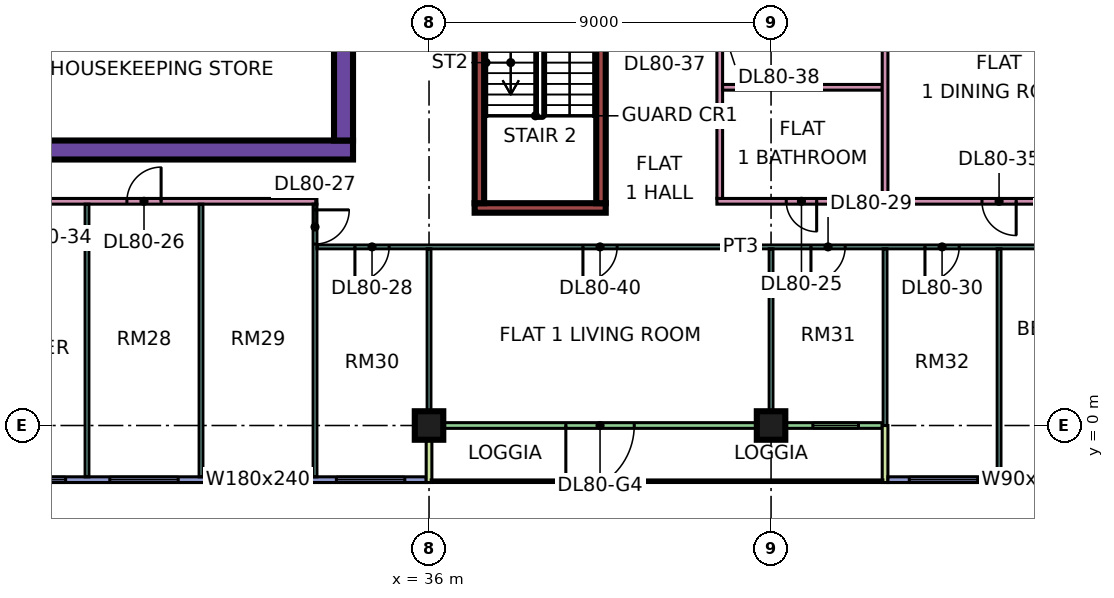
"""IFC4 building model, lengths in metres.
Left out: names, types, materials, properties, quantities, classifications, styles, units other than length and angle.
Written with IfcOpenShell. Run it as: python <this file> out.ifc"""

import sys

from ifc_helpers import new_model, si_unit, direction, frame, frame_2d, origin, origin_2d, place, context, subcontext, project, spatial, rectangle, extrude, element, fill, save


model = new_model("IFC4")
c1 = context("Model", 3, precision=1e-05, world=origin(), true_north=direction((0.0, 1.0)))
c2 = subcontext(c1, "Body", "Model", "MODEL_VIEW")
j1 = project(units=[si_unit("LENGTHUNIT", "METRE"), si_unit("PLANEANGLEUNIT", "RADIAN")], contexts=[c1])
p1 = place(None, origin())
s1 = spatial("IfcSite", under=j1, at=p1, CompositionType="ELEMENT")
p2 = place(p1, origin())
s2 = spatial("IfcBuilding", under=s1, at=p2, CompositionType="ELEMENT")
p3 = place(p2, frame((0.0, 0.0, 346.4)))
s3 = spatial("IfcBuildingStorey", under=s2, at=p3, CompositionType="ELEMENT", Elevation=346.4)
for number, where, z_axis, x_axis in (
    (1, (36.0, 0.0, 0.0), (0.0, 0.0, 1.0), (1.0, 0.0, 0.0)),
    (2, (45.0, 0.0, 0.0), (0.0, 0.0, 1.0), (1.0, 0.0, 0.0)),
):
    element("IfcColumn", number, at=place(p3, frame(where, z_axis=z_axis, x_axis=x_axis)), inside=s3, PredefinedType="COLUMN", context=c2, shape_type="SweptSolid", body=[
        extrude(rectangle(XDim=0.75, YDim=0.75, at=origin_2d()), origin(), (0.0, 0.0, 1.0), 3.75),
    ])
p4 = place(p3, frame((9.0, 7.25, 0.0), z_axis=(0.0, 0.0, 1.0), x_axis=(1.0, 0.0, 0.0)))
e3 = element("IfcWall", 3, at=p4, inside=s3, PredefinedType="SHEAR", context=c2, shape_type="SweptSolid", body=[
    extrude(rectangle(XDim=25.0, YDim=0.5, at=frame_2d((12.5, 0.0))), origin(), (0.0, 0.0, 1.0), 3.75),
])
p5 = place(p3, frame((33.75, 7.5, 0.0), z_axis=(0.0, 0.0, 1.0), x_axis=(0.0, 1.0, 0.0)))
e4 = element("IfcWall", 4, at=p5, inside=s3, PredefinedType="SHEAR", context=c2, shape_type="SweptSolid", body=[
    extrude(rectangle(XDim=12.0, YDim=0.5, at=frame_2d((6.0, 0.0))), origin(), (0.0, 0.0, 1.0), 3.75),
])
p6 = place(p5, frame((5.7, 0.0, 0.0)))
e5 = element("IfcOpeningElement", 5, at=p6, cuts=e4, PredefinedType="OPENING", context=c2, shape_type="SweptSolid", body=[
    extrude(rectangle(XDim=1.8, YDim=2.4, at=frame_2d((0.9, 1.2))), frame((0.0, 0.26, 0.0), z_axis=(0.0, -1.0, 0.0), x_axis=(1.0, 0.0, 0.0)), (0.0, 0.0, 1.0), 0.52),
])
p7 = place(p3, frame((37.2, 5.725, 0.0), z_axis=(0.0, 0.0, 1.0), x_axis=(1.0, 0.0, 0.0)))
e6 = element("IfcWall", 6, at=p7, inside=s3, PredefinedType="SHEAR", context=c2, shape_type="SweptSolid", body=[
    extrude(rectangle(XDim=3.45, YDim=0.25, at=frame_2d((1.725, 0.0))), origin(), (0.0, 0.0, 1.0), 3.75),
])
for number, where, z_axis, x_axis in (
    (7, (37.325, 5.85, 0.0), (0.0, 0.0, 1.0), (0.0, 1.0, 0.0)),
    (8, (40.525, 5.85, 0.0), (0.0, 0.0, 1.0), (0.0, 1.0, 0.0)),
):
    element("IfcWall", number, at=place(p3, frame(where, z_axis=z_axis, x_axis=x_axis)), inside=s3, PredefinedType="SHEAR", context=c2, shape_type="SweptSolid", body=[
        extrude(rectangle(XDim=6.5, YDim=0.25, at=frame_2d((3.25, 0.0))), origin(), (0.0, 0.0, 1.0), 3.75),
    ])
p8 = place(p3, frame((24.075, -1.425, 0.0), z_axis=(0.0, 0.0, 1.0), x_axis=(1.0, 0.0, 0.0)))
e9 = element("IfcWall", 9, at=p8, inside=s3, PredefinedType="SOLIDWALL", context=c2, shape_type="SweptSolid", body=[
    extrude(rectangle(XDim=11.85, YDim=0.15, at=frame_2d((5.925, 0.0))), origin(), (0.0, 0.0, 1.0), 3.35),
])
p9 = place(p8, frame((0.562, 0.0, 0.45)))
e10 = element("IfcOpeningElement", 10, at=p9, cuts=e9, PredefinedType="OPENING", context=c2, shape_type="SweptSolid", body=[
    extrude(rectangle(XDim=1.8, YDim=2.4, at=frame_2d((0.9, 1.2))), frame((0.0, 0.085, 0.0), z_axis=(0.0, -1.0, 0.0), x_axis=(1.0, 0.0, 0.0)), (0.0, 0.0, 1.0), 0.17),
])
p10 = place(p8, frame((3.525, 0.0, 0.45)))
e11 = element("IfcOpeningElement", 11, at=p10, cuts=e9, PredefinedType="OPENING", context=c2, shape_type="SweptSolid", body=[
    extrude(rectangle(XDim=1.8, YDim=2.4, at=frame_2d((0.9, 1.2))), frame((0.0, 0.085, 0.0), z_axis=(0.0, -1.0, 0.0), x_axis=(1.0, 0.0, 0.0)), (0.0, 0.0, 1.0), 0.17),
])
p11 = place(p8, frame((6.525, 0.0, 0.45)))
e12 = element("IfcOpeningElement", 12, at=p11, cuts=e9, PredefinedType="OPENING", context=c2, shape_type="SweptSolid", body=[
    extrude(rectangle(XDim=1.8, YDim=2.4, at=frame_2d((0.9, 1.2))), frame((0.0, 0.085, 0.0), z_axis=(0.0, -1.0, 0.0), x_axis=(1.0, 0.0, 0.0)), (0.0, 0.0, 1.0), 0.17),
])
p12 = place(p8, frame((9.488, 0.0, 0.45)))
e13 = element("IfcOpeningElement", 13, at=p12, cuts=e9, PredefinedType="OPENING", context=c2, shape_type="SweptSolid", body=[
    extrude(rectangle(XDim=1.8, YDim=2.4, at=frame_2d((0.9, 1.2))), frame((0.0, 0.085, 0.0), z_axis=(0.0, -1.0, 0.0), x_axis=(1.0, 0.0, 0.0)), (0.0, 0.0, 1.0), 0.17),
])
p13 = place(p3, frame((36.075, 0.0, 0.0), z_axis=(0.0, 0.0, 1.0), x_axis=(1.0, 0.0, 0.0)))
e14 = element("IfcWall", 14, at=p13, inside=s3, PredefinedType="SOLIDWALL", context=c2, shape_type="SweptSolid", body=[
    extrude(rectangle(XDim=11.85, YDim=0.15, at=frame_2d((5.925, 0.0))), origin(), (0.0, 0.0, 1.0), 3.35),
])
p14 = place(p13, frame((3.525, 0.0, 0.0)))
e15 = element("IfcOpeningElement", 15, at=p14, cuts=e14, PredefinedType="OPENING", context=c2, shape_type="SweptSolid", body=[
    extrude(rectangle(XDim=1.8, YDim=2.4, at=frame_2d((0.9, 1.2))), frame((0.0, 0.085, 0.0), z_axis=(0.0, -1.0, 0.0), x_axis=(1.0, 0.0, 0.0)), (0.0, 0.0, 1.0), 0.17),
])
p15 = place(p13, frame((10.025, 0.0, 0.45)))
e16 = element("IfcOpeningElement", 16, at=p15, cuts=e14, PredefinedType="OPENING", context=c2, shape_type="SweptSolid", body=[
    extrude(rectangle(XDim=1.2, YDim=2.4, at=frame_2d((0.6, 1.2))), frame((0.0, 0.085, 0.0), z_axis=(0.0, -1.0, 0.0), x_axis=(1.0, 0.0, 0.0)), (0.0, 0.0, 1.0), 0.17),
])
for number, where, z_axis, x_axis in (
    (17, (36.0, -1.5, 0.0), (0.0, 0.0, 1.0), (0.0, 1.0, 0.0)),
    (18, (48.0, -1.5, 0.0), (0.0, 0.0, 1.0), (0.0, 1.0, 0.0)),
):
    element("IfcWall", number, at=place(p3, frame(where, z_axis=z_axis, x_axis=x_axis)), inside=s3, PredefinedType="SOLIDWALL", context=c2, shape_type="SweptSolid", body=[
        extrude(rectangle(XDim=1.5, YDim=0.15, at=frame_2d((0.75, 0.0))), origin(), (0.0, 0.0, 1.0), 3.35),
    ])
p16 = place(p3, frame((48.075, -1.425, 0.0), z_axis=(0.0, 0.0, 1.0), x_axis=(1.0, 0.0, 0.0)))
e19 = element("IfcWall", 19, at=p16, inside=s3, PredefinedType="SOLIDWALL", context=c2, shape_type="SweptSolid", body=[
    extrude(rectangle(XDim=4.425, YDim=0.15, at=frame_2d((2.212, 0.0))), origin(), (0.0, 0.0, 1.0), 3.35),
])
p17 = place(p16, frame((0.562, 0.0, 0.45)))
e20 = element("IfcOpeningElement", 20, at=p17, cuts=e19, PredefinedType="OPENING", context=c2, shape_type="SweptSolid", body=[
    extrude(rectangle(XDim=1.8, YDim=2.4, at=frame_2d((0.9, 1.2))), frame((0.0, 0.085, 0.0), z_axis=(0.0, -1.0, 0.0), x_axis=(1.0, 0.0, 0.0)), (0.0, 0.0, 1.0), 0.17),
])
p18 = place(p16, frame((3.225, 0.0, 0.45)))
e21 = element("IfcOpeningElement", 21, at=p18, cuts=e19, PredefinedType="OPENING", context=c2, shape_type="SweptSolid", body=[
    extrude(rectangle(XDim=0.9, YDim=2.4, at=frame_2d((0.45, 1.2))), frame((0.0, 0.085, 0.0), z_axis=(0.0, -1.0, 0.0), x_axis=(1.0, 0.0, 0.0)), (0.0, 0.0, 1.0), 0.17),
])
p19 = place(p3, frame((11.95, 5.9, 0.0), z_axis=(0.0, 0.0, 1.0), x_axis=(1.0, 0.0, 0.0)))
e22 = element("IfcWall", 22, at=p19, inside=s3, PredefinedType="PARTITIONING", context=c2, shape_type="SweptSolid", body=[
    extrude(rectangle(XDim=21.1, YDim=0.15, at=frame_2d((10.55, 0.0))), origin(), (0.0, 0.0, 1.0), 3.35),
])
p20 = place(p19, frame((16.1, 0.0, 0.0)))
e23 = element("IfcOpeningElement", 23, at=p20, cuts=e22, PredefinedType="OPENING", context=c2, shape_type="SweptSolid", body=[
    extrude(rectangle(XDim=0.9, YDim=2.1, at=frame_2d((0.45, 1.05))), frame((0.0, 0.085, 0.0), z_axis=(0.0, -1.0, 0.0), x_axis=(1.0, 0.0, 0.0)), (0.0, 0.0, 1.0), 0.17),
])
p21 = place(p19, frame((13.1, 0.0, 0.0)))
e24 = element("IfcOpeningElement", 24, at=p21, cuts=e22, PredefinedType="OPENING", context=c2, shape_type="SweptSolid", body=[
    extrude(rectangle(XDim=0.9, YDim=2.1, at=frame_2d((0.45, 1.05))), frame((0.0, 0.085, 0.0), z_axis=(0.0, -1.0, 0.0), x_axis=(1.0, 0.0, 0.0)), (0.0, 0.0, 1.0), 0.17),
])
p22 = place(p19, frame((4.1, 0.0, 0.0)))
e25 = element("IfcOpeningElement", 25, at=p22, cuts=e22, PredefinedType="OPENING", context=c2, shape_type="SweptSolid", body=[
    extrude(rectangle(XDim=0.9, YDim=2.1, at=frame_2d((0.45, 1.05))), frame((0.0, 0.085, 0.0), z_axis=(0.0, -1.0, 0.0), x_axis=(1.0, 0.0, 0.0)), (0.0, 0.0, 1.0), 0.17),
])
for number, where, z_axis, x_axis in (
    (26, (27.0, -1.351, 0.0), (0.0, 0.0, 1.0), (0.0, 1.0, 0.0)),
    (27, (30.0, -1.351, 0.0), (0.0, 0.0, 1.0), (0.0, 1.0, 0.0)),
):
    element("IfcWall", number, at=place(p3, frame(where, z_axis=z_axis, x_axis=x_axis)), inside=s3, PredefinedType="PARTITIONING", context=c2, shape_type="SweptSolid", body=[
        extrude(rectangle(XDim=7.176, YDim=0.1, at=frame_2d((3.588, 0.0))), origin(), (0.0, 0.0, 1.0), 3.35),
    ])
p23 = place(p3, frame((33.0, -1.351, 0.0), z_axis=(0.0, 0.0, 1.0), x_axis=(0.0, 1.0, 0.0)))
e28 = element("IfcWall", 28, at=p23, inside=s3, PredefinedType="PARTITIONING", context=c2, shape_type="SweptSolid", body=[
    extrude(rectangle(XDim=7.176, YDim=0.1, at=frame_2d((3.588, 0.0))), origin(), (0.0, 0.0, 1.0), 3.35),
])
p24 = place(p23, frame((6.126, 0.0, 0.0)))
e29 = element("IfcOpeningElement", 29, at=p24, cuts=e28, PredefinedType="OPENING", context=c2, shape_type="SweptSolid", body=[
    extrude(rectangle(XDim=0.9, YDim=2.1, at=frame_2d((0.45, 1.05))), frame((0.0, 0.06, 0.0), z_axis=(0.0, -1.0, 0.0), x_axis=(1.0, 0.0, 0.0)), (0.0, 0.0, 1.0), 0.12),
])
p25 = place(p3, frame((33.05, 4.7, 0.0), z_axis=(0.0, 0.0, 1.0), x_axis=(1.0, 0.0, 0.0)))
e30 = element("IfcWall", 30, at=p25, inside=s3, PredefinedType="PARTITIONING", context=c2, shape_type="SweptSolid", body=[
    extrude(rectangle(XDim=22.301, YDim=0.1, at=frame_2d((11.15, 0.0))), origin(), (0.0, 0.0, 1.0), 3.35),
])
p26 = place(p25, frame((1.0, 0.0, 0.0)))
e31 = element("IfcOpeningElement", 31, at=p26, cuts=e30, PredefinedType="OPENING", context=c2, shape_type="SweptSolid", body=[
    extrude(rectangle(XDim=0.9, YDim=2.1, at=frame_2d((0.45, 1.05))), frame((0.0, 0.06, 0.0), z_axis=(0.0, -1.0, 0.0), x_axis=(1.0, 0.0, 0.0)), (0.0, 0.0, 1.0), 0.12),
])
p27 = place(p25, frame((13.0, 0.0, 0.0)))
e32 = element("IfcOpeningElement", 32, at=p27, cuts=e30, PredefinedType="OPENING", context=c2, shape_type="SweptSolid", body=[
    extrude(rectangle(XDim=0.9, YDim=2.1, at=frame_2d((0.45, 1.05))), frame((0.0, 0.06, 0.0), z_axis=(0.0, -1.0, 0.0), x_axis=(1.0, 0.0, 0.0)), (0.0, 0.0, 1.0), 0.12),
])
p28 = place(p25, frame((16.0, 0.0, 0.0)))
e33 = element("IfcOpeningElement", 33, at=p28, cuts=e30, PredefinedType="OPENING", context=c2, shape_type="SweptSolid", body=[
    extrude(rectangle(XDim=0.9, YDim=2.1, at=frame_2d((0.45, 1.05))), frame((0.0, 0.06, 0.0), z_axis=(0.0, -1.0, 0.0), x_axis=(1.0, 0.0, 0.0)), (0.0, 0.0, 1.0), 0.12),
])
p29 = place(p25, frame((19.0, 0.0, 0.0)))
e34 = element("IfcOpeningElement", 34, at=p29, cuts=e30, PredefinedType="OPENING", context=c2, shape_type="SweptSolid", body=[
    extrude(rectangle(XDim=0.9, YDim=2.1, at=frame_2d((0.45, 1.05))), frame((0.0, 0.06, 0.0), z_axis=(0.0, -1.0, 0.0), x_axis=(1.0, 0.0, 0.0)), (0.0, 0.0, 1.0), 0.12),
])
p30 = place(p25, frame((7.0, 0.0, 0.0)))
e35 = element("IfcOpeningElement", 35, at=p30, cuts=e30, PredefinedType="OPENING", context=c2, shape_type="SweptSolid", body=[
    extrude(rectangle(XDim=0.9, YDim=2.1, at=frame_2d((0.45, 1.05))), frame((0.0, 0.06, 0.0), z_axis=(0.0, -1.0, 0.0), x_axis=(1.0, 0.0, 0.0)), (0.0, 0.0, 1.0), 0.12),
])
p31 = place(p3, frame((36.0, 0.0, 0.0), z_axis=(0.0, 0.0, 1.0), x_axis=(0.0, 1.0, 0.0)))
e36 = element("IfcWall", 36, at=p31, inside=s3, PredefinedType="PARTITIONING", context=c2, shape_type="SweptSolid", body=[
    extrude(rectangle(XDim=4.65, YDim=0.1, at=frame_2d((2.325, 0.0))), origin(), (0.0, 0.0, 1.0), 3.35),
])
p32 = place(p3, frame((43.575, 5.9, 0.0), z_axis=(0.0, 0.0, 1.0), x_axis=(1.0, 0.0, 0.0)))
e37 = element("IfcWall", 37, at=p32, inside=s3, PredefinedType="PARTITIONING", context=c2, shape_type="SweptSolid", body=[
    extrude(rectangle(XDim=11.775, YDim=0.15, at=frame_2d((5.888, 0.0))), origin(), (0.0, 0.0, 1.0), 3.35),
])
p33 = place(p32, frame((1.825, 0.0, 0.0)))
e38 = element("IfcOpeningElement", 38, at=p33, cuts=e37, PredefinedType="OPENING", context=c2, shape_type="SweptSolid", body=[
    extrude(rectangle(XDim=0.8, YDim=2.1, at=frame_2d((0.4, 1.05))), frame((0.0, 0.085, 0.0), z_axis=(0.0, -1.0, 0.0), x_axis=(1.0, 0.0, 0.0)), (0.0, 0.0, 1.0), 0.17),
])
p34 = place(p32, frame((6.975, 0.0, 0.0)))
e39 = element("IfcOpeningElement", 39, at=p34, cuts=e37, PredefinedType="OPENING", context=c2, shape_type="SweptSolid", body=[
    extrude(rectangle(XDim=0.9, YDim=2.1, at=frame_2d((0.45, 1.05))), frame((0.0, 0.085, 0.0), z_axis=(0.0, -1.0, 0.0), x_axis=(1.0, 0.0, 0.0)), (0.0, 0.0, 1.0), 0.17),
])
p35 = place(p3, frame((43.65, 5.975, 0.0), z_axis=(0.0, 0.0, 1.0), x_axis=(0.0, 1.0, 0.0)))
e40 = element("IfcWall", 40, at=p35, inside=s3, PredefinedType="PARTITIONING", context=c2, shape_type="SweptSolid", body=[
    extrude(rectangle(XDim=6.3, YDim=0.15, at=frame_2d((3.15, 0.0))), origin(), (0.0, 0.0, 1.0), 3.35),
])
p36 = place(p35, frame((4.275, 0.0, 0.0)))
e41 = element("IfcOpeningElement", 41, at=p36, cuts=e40, PredefinedType="OPENING", context=c2, shape_type="SweptSolid", body=[
    extrude(rectangle(XDim=0.9, YDim=2.1, at=frame_2d((0.45, 1.05))), frame((0.0, 0.085, 0.0), z_axis=(0.0, -1.0, 0.0), x_axis=(1.0, 0.0, 0.0)), (0.0, 0.0, 1.0), 0.17),
])
p37 = place(p3, frame((43.725, 8.9, 0.0), z_axis=(0.0, 0.0, 1.0), x_axis=(1.0, 0.0, 0.0)))
e42 = element("IfcWall", 42, at=p37, inside=s3, PredefinedType="PARTITIONING", context=c2, shape_type="SweptSolid", body=[
    extrude(rectangle(XDim=4.2, YDim=0.15, at=frame_2d((2.1, 0.0))), origin(), (0.0, 0.0, 1.0), 3.35),
])
p38 = place(p3, frame((45.0, 0.074, 0.0), z_axis=(0.0, 0.0, 1.0), x_axis=(0.0, 1.0, 0.0)))
e43 = element("IfcWall", 43, at=p38, inside=s3, PredefinedType="PARTITIONING", context=c2, shape_type="SweptSolid", body=[
    extrude(rectangle(XDim=4.576, YDim=0.1, at=frame_2d((2.288, 0.0))), origin(), (0.0, 0.0, 1.0), 3.35),
])
p39 = place(p3, frame((48.0, 0.0, 0.0), z_axis=(0.0, 0.0, 1.0), x_axis=(0.0, 1.0, 0.0)))
e44 = element("IfcWall", 44, at=p39, inside=s3, PredefinedType="PARTITIONING", context=c2, shape_type="SweptSolid", body=[
    extrude(rectangle(XDim=4.65, YDim=0.1, at=frame_2d((2.325, 0.0))), origin(), (0.0, 0.0, 1.0), 3.35),
])
p40 = place(p3, frame((48.0, 5.975, 0.0), z_axis=(0.0, 0.0, 1.0), x_axis=(0.0, 1.0, 0.0)))
e45 = element("IfcWall", 45, at=p40, inside=s3, PredefinedType="PARTITIONING", context=c2, shape_type="SweptSolid", body=[
    extrude(rectangle(XDim=6.3, YDim=0.15, at=frame_2d((3.15, 0.0))), origin(), (0.0, 0.0, 1.0), 3.35),
])
p41 = place(p3, frame((51.0, -1.351, 0.0), z_axis=(0.0, 0.0, 1.0), x_axis=(0.0, 1.0, 0.0)))
e46 = element("IfcWall", 46, at=p41, inside=s3, PredefinedType="PARTITIONING", context=c2, shape_type="SweptSolid", body=[
    extrude(rectangle(XDim=6.001, YDim=0.1, at=frame_2d((3.0, 0.0))), origin(), (0.0, 0.0, 1.0), 3.35),
])
p42 = place(p9, origin())
e47 = element("IfcWindow", 47, at=p42, inside=s3, PartitioningType="SINGLE_PANEL", PredefinedType="WINDOW", context=c2, shape_type="SweptSolid", body=[
    extrude(rectangle(XDim=1.8, YDim=2.4, at=frame_2d((0.9, 1.2))), frame((0.0, 0.03, 0.0), z_axis=(0.0, -1.0, 0.0), x_axis=(1.0, 0.0, 0.0)), (0.0, 0.0, 1.0), 0.06),
])
fill(e10, e47)
p43 = place(p10, origin())
e48 = element("IfcWindow", 48, at=p43, inside=s3, PartitioningType="SINGLE_PANEL", PredefinedType="WINDOW", context=c2, shape_type="SweptSolid", body=[
    extrude(rectangle(XDim=1.8, YDim=2.4, at=frame_2d((0.9, 1.2))), frame((0.0, 0.03, 0.0), z_axis=(0.0, -1.0, 0.0), x_axis=(1.0, 0.0, 0.0)), (0.0, 0.0, 1.0), 0.06),
])
fill(e11, e48)
p44 = place(p11, origin())
e49 = element("IfcWindow", 49, at=p44, inside=s3, PartitioningType="SINGLE_PANEL", PredefinedType="WINDOW", context=c2, shape_type="SweptSolid", body=[
    extrude(rectangle(XDim=1.8, YDim=2.4, at=frame_2d((0.9, 1.2))), frame((0.0, 0.03, 0.0), z_axis=(0.0, -1.0, 0.0), x_axis=(1.0, 0.0, 0.0)), (0.0, 0.0, 1.0), 0.06),
])
fill(e12, e49)
p45 = place(p12, origin())
e50 = element("IfcWindow", 50, at=p45, inside=s3, PartitioningType="SINGLE_PANEL", PredefinedType="WINDOW", context=c2, shape_type="SweptSolid", body=[
    extrude(rectangle(XDim=1.8, YDim=2.4, at=frame_2d((0.9, 1.2))), frame((0.0, 0.03, 0.0), z_axis=(0.0, -1.0, 0.0), x_axis=(1.0, 0.0, 0.0)), (0.0, 0.0, 1.0), 0.06),
])
fill(e13, e50)
p46 = place(p14, frame((1.8, 0.0, 0.0), z_axis=(0.0, 0.0, 1.0), x_axis=(-1.0, 0.0, 0.0)))
e51 = element("IfcDoor", 51, at=p46, inside=s3, OperationType="DOUBLE_DOOR_SINGLE_SWING", PredefinedType="DOOR", context=c2, shape_type="SweptSolid", body=[
    extrude(rectangle(XDim=1.8, YDim=2.4, at=frame_2d((0.9, 1.2))), frame((0.0, 0.025, 0.0), z_axis=(0.0, -1.0, 0.0), x_axis=(1.0, 0.0, 0.0)), (0.0, 0.0, 1.0), 0.05),
])
fill(e15, e51)
p47 = place(p15, origin())
e52 = element("IfcWindow", 52, at=p47, inside=s3, PartitioningType="SINGLE_PANEL", PredefinedType="WINDOW", context=c2, shape_type="SweptSolid", body=[
    extrude(rectangle(XDim=1.2, YDim=2.4, at=frame_2d((0.6, 1.2))), frame((0.0, 0.03, 0.0), z_axis=(0.0, -1.0, 0.0), x_axis=(1.0, 0.0, 0.0)), (0.0, 0.0, 1.0), 0.06),
])
fill(e16, e52)
p48 = place(p17, origin())
e53 = element("IfcWindow", 53, at=p48, inside=s3, PartitioningType="SINGLE_PANEL", PredefinedType="WINDOW", context=c2, shape_type="SweptSolid", body=[
    extrude(rectangle(XDim=1.8, YDim=2.4, at=frame_2d((0.9, 1.2))), frame((0.0, 0.03, 0.0), z_axis=(0.0, -1.0, 0.0), x_axis=(1.0, 0.0, 0.0)), (0.0, 0.0, 1.0), 0.06),
])
fill(e20, e53)
p49 = place(p18, origin())
e54 = element("IfcWindow", 54, at=p49, inside=s3, PartitioningType="SINGLE_PANEL", PredefinedType="WINDOW", context=c2, shape_type="SweptSolid", body=[
    extrude(rectangle(XDim=0.9, YDim=2.4, at=frame_2d((0.45, 1.2))), frame((0.0, 0.03, 0.0), z_axis=(0.0, -1.0, 0.0), x_axis=(1.0, 0.0, 0.0)), (0.0, 0.0, 1.0), 0.06),
])
fill(e21, e54)
p50 = place(p33, origin())
e55 = element("IfcDoor", 55, at=p50, inside=s3, OperationType="SINGLE_SWING_RIGHT", PredefinedType="DOOR", context=c2, shape_type="SweptSolid", body=[
    extrude(rectangle(XDim=0.8, YDim=2.1, at=frame_2d((0.4, 1.05))), frame((0.0, 0.025, 0.0), z_axis=(0.0, -1.0, 0.0), x_axis=(1.0, 0.0, 0.0)), (0.0, 0.0, 1.0), 0.05),
])
fill(e38, e55)
p51 = place(p20, frame((0.9, 0.0, 0.0), z_axis=(0.0, 0.0, 1.0), x_axis=(-1.0, 0.0, 0.0)))
e56 = element("IfcDoor", 56, at=p51, inside=s3, OperationType="SINGLE_SWING_RIGHT", PredefinedType="DOOR", context=c2, shape_type="SweptSolid", body=[
    extrude(rectangle(XDim=0.9, YDim=2.1, at=frame_2d((0.45, 1.05))), frame((0.0, 0.025, 0.0), z_axis=(0.0, -1.0, 0.0), x_axis=(1.0, 0.0, 0.0)), (0.0, 0.0, 1.0), 0.05),
])
fill(e23, e56)
p52 = place(p24, origin())
e57 = element("IfcDoor", 57, at=p52, inside=s3, OperationType="SINGLE_SWING_RIGHT", PredefinedType="DOOR", context=c2, shape_type="SweptSolid", body=[
    extrude(rectangle(XDim=0.9, YDim=2.1, at=frame_2d((0.45, 1.05))), frame((0.0, 0.025, 0.0), z_axis=(0.0, -1.0, 0.0), x_axis=(1.0, 0.0, 0.0)), (0.0, 0.0, 1.0), 0.05),
])
fill(e29, e57)
p53 = place(p26, frame((0.9, 0.0, 0.0), z_axis=(0.0, 0.0, 1.0), x_axis=(-1.0, 0.0, 0.0)))
e58 = element("IfcDoor", 58, at=p53, inside=s3, OperationType="SINGLE_SWING_LEFT", PredefinedType="DOOR", context=c2, shape_type="SweptSolid", body=[
    extrude(rectangle(XDim=0.9, YDim=2.1, at=frame_2d((0.45, 1.05))), frame((0.0, 0.025, 0.0), z_axis=(0.0, -1.0, 0.0), x_axis=(1.0, 0.0, 0.0)), (0.0, 0.0, 1.0), 0.05),
])
fill(e31, e58)
p54 = place(p27, frame((0.9, 0.0, 0.0), z_axis=(0.0, 0.0, 1.0), x_axis=(-1.0, 0.0, 0.0)))
e59 = element("IfcDoor", 59, at=p54, inside=s3, OperationType="SINGLE_SWING_LEFT", PredefinedType="DOOR", context=c2, shape_type="SweptSolid", body=[
    extrude(rectangle(XDim=0.9, YDim=2.1, at=frame_2d((0.45, 1.05))), frame((0.0, 0.025, 0.0), z_axis=(0.0, -1.0, 0.0), x_axis=(1.0, 0.0, 0.0)), (0.0, 0.0, 1.0), 0.05),
])
fill(e32, e59)
p55 = place(p28, frame((0.9, 0.0, 0.0), z_axis=(0.0, 0.0, 1.0), x_axis=(-1.0, 0.0, 0.0)))
e60 = element("IfcDoor", 60, at=p55, inside=s3, OperationType="SINGLE_SWING_LEFT", PredefinedType="DOOR", context=c2, shape_type="SweptSolid", body=[
    extrude(rectangle(XDim=0.9, YDim=2.1, at=frame_2d((0.45, 1.05))), frame((0.0, 0.025, 0.0), z_axis=(0.0, -1.0, 0.0), x_axis=(1.0, 0.0, 0.0)), (0.0, 0.0, 1.0), 0.05),
])
fill(e33, e60)
p56 = place(p34, origin())
e61 = element("IfcDoor", 61, at=p56, inside=s3, OperationType="SINGLE_SWING_RIGHT", PredefinedType="DOOR", context=c2, shape_type="SweptSolid", body=[
    extrude(rectangle(XDim=0.9, YDim=2.1, at=frame_2d((0.45, 1.05))), frame((0.0, 0.025, 0.0), z_axis=(0.0, -1.0, 0.0), x_axis=(1.0, 0.0, 0.0)), (0.0, 0.0, 1.0), 0.05),
])
fill(e39, e61)
p57 = place(p30, frame((0.9, 0.0, 0.0), z_axis=(0.0, 0.0, 1.0), x_axis=(-1.0, 0.0, 0.0)))
e62 = element("IfcDoor", 62, at=p57, inside=s3, OperationType="SINGLE_SWING_LEFT", PredefinedType="DOOR", context=c2, shape_type="SweptSolid", body=[
    extrude(rectangle(XDim=0.9, YDim=2.1, at=frame_2d((0.45, 1.05))), frame((0.0, 0.025, 0.0), z_axis=(0.0, -1.0, 0.0), x_axis=(1.0, 0.0, 0.0)), (0.0, 0.0, 1.0), 0.05),
])
fill(e35, e62)
save(model, sys.argv[1])
